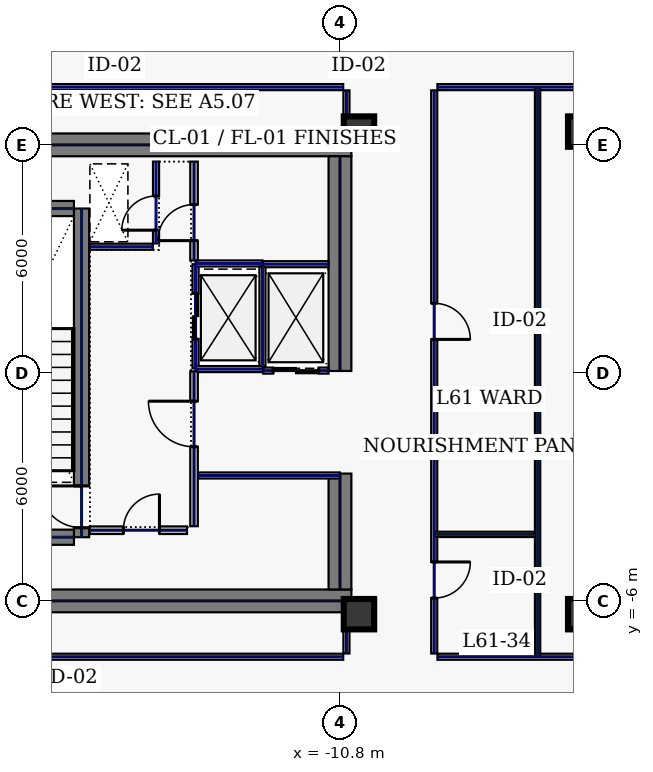
"""IFC4 building model, lengths in metres.
Left out: names, types, materials, properties, quantities, classifications, styles, units other than length and angle.
Written with IfcOpenShell. Run it as: python <this file> out.ifc"""

import sys

from ifc_helpers import new_model, si_unit, direction, frame, frame_2d, origin, origin_2d, place, context, subcontext, project, spatial, rectangle, hollow_rectangle, extrude, element, fill, save


model = new_model("IFC4")
c1 = context("Model", 3, precision=1e-05, world=origin(), true_north=direction((0.0, 1.0)))
c2 = subcontext(c1, "Body", "Model", "MODEL_VIEW")
j1 = project(units=[si_unit("LENGTHUNIT", "METRE"), si_unit("PLANEANGLEUNIT", "RADIAN")], contexts=[c1])
p1 = place(None, origin())
s1 = spatial("IfcSite", under=j1, at=p1, CompositionType="ELEMENT")
p2 = place(p1, origin())
s2 = spatial("IfcBuilding", under=s1, at=p2, CompositionType="ELEMENT")
p3 = place(p2, frame((0.0, 0.0, 263.0)))
s3 = spatial("IfcBuildingStorey", under=s2, at=p3, CompositionType="ELEMENT", Elevation=263.0)
for number, where, z_axis, x_axis in (
    (1, (-22.0, 6.0, 0.0), (0.0, 0.0, 1.0), (1.0, 0.0, 0.0)),
    (2, (-22.0, -6.0, 0.0), (0.0, 0.0, 1.0), (1.0, 0.0, 0.0)),
):
    element("IfcWall", number, at=place(p3, frame(where, z_axis=z_axis, x_axis=x_axis)), inside=s3, PredefinedType="SHEAR", context=c2, shape_type="SweptSolid", body=[
        extrude(rectangle(XDim=11.5, YDim=0.6, at=frame_2d((5.75, 0.0))), origin(), (0.0, 0.0, 1.0), 3.74),
    ])
p4 = place(p3, frame((-10.8, -5.7, 0.0), z_axis=(0.0, 0.0, 1.0), x_axis=(0.0, 1.0, 0.0)))
e3 = element("IfcWall", 3, at=p4, inside=s3, PredefinedType="SHEAR", context=c2, shape_type="SweptSolid", body=[
    extrude(rectangle(XDim=3.05, YDim=0.6, at=frame_2d((1.525, 0.0))), origin(), (0.0, 0.0, 1.0), 3.74),
])
p5 = place(p3, frame((-10.8, 0.05, 0.0), z_axis=(0.0, 0.0, 1.0), x_axis=(0.0, 1.0, 0.0)))
e4 = element("IfcWall", 4, at=p5, inside=s3, PredefinedType="SHEAR", context=c2, shape_type="SweptSolid", body=[
    extrude(rectangle(XDim=5.65, YDim=0.6, at=frame_2d((2.825, 0.0))), origin(), (0.0, 0.0, 1.0), 3.74),
])
p6 = place(p3, frame((-17.6, -4.325, 0.0), z_axis=(0.0, 0.0, 1.0), x_axis=(0.0, 1.0, 0.0)))
e5 = element("IfcWall", 5, at=p6, inside=s3, PredefinedType="SHEAR", context=c2, shape_type="SweptSolid", body=[
    extrude(rectangle(XDim=8.65, YDim=0.4, at=frame_2d((4.325, 0.0))), origin(), (0.0, 0.0, 1.0), 3.74),
])
p7 = place(p6, frame((0.25, 0.0, 0.0)))
e6 = element("IfcOpeningElement", 6, at=p7, cuts=e5, PredefinedType="OPENING", context=c2, shape_type="SweptSolid", body=[
    extrude(rectangle(XDim=1.1, YDim=2.2, at=frame_2d((0.55, 1.1))), frame((0.0, 0.21, 0.0), z_axis=(0.0, -1.0, 0.0), x_axis=(1.0, 0.0, 0.0)), (0.0, 0.0, 1.0), 0.42),
])
for number, where, z_axis, x_axis in (
    (7, (-21.2, -4.325, 0.0), (0.0, 0.0, 1.0), (1.0, 0.0, 0.0)),
    (8, (-21.2, 4.325, 0.0), (0.0, 0.0, 1.0), (1.0, 0.0, 0.0)),
):
    element("IfcWall", number, at=place(p3, frame(where, z_axis=z_axis, x_axis=x_axis)), inside=s3, PredefinedType="SHEAR", context=c2, shape_type="SweptSolid", body=[
        extrude(rectangle(XDim=3.4, YDim=0.4, at=frame_2d((1.7, 0.0))), origin(), (0.0, 0.0, 1.0), 3.74),
    ])
for number, where, z_axis, x_axis in (
    (9, (-10.3, -6.35, 0.0), (0.0, 0.0, 1.0), (1.0, 0.0, 0.0)),
    (10, (-10.3, 6.35, 0.0), (0.0, 0.0, 1.0), (1.0, 0.0, 0.0)),
    (11, (-4.4, -6.35, 0.0), (0.0, 0.0, 1.0), (1.0, 0.0, 0.0)),
    (12, (-4.4, 6.35, 0.0), (0.0, 0.0, 1.0), (1.0, 0.0, 0.0)),
):
    element("IfcColumn", number, at=place(p3, frame(where, z_axis=z_axis, x_axis=x_axis)), inside=s3, PredefinedType="COLUMN", context=c2, shape_type="SweptSolid", body=[
        extrude(hollow_rectangle(XDim=0.8, YDim=0.8, WallThickness=0.036, at=origin_2d()), origin(), (0.0, 0.0, 1.0), 3.74),
    ])
p8 = place(p3, frame((-14.6, 0.12, 0.0), z_axis=(0.0, 0.0, 1.0), x_axis=(0.0, 1.0, 0.0)))
e13 = element("IfcWall", 13, at=p8, inside=s3, PredefinedType="PARTITIONING", context=c2, shape_type="SweptSolid", body=[
    extrude(rectangle(XDim=2.74, YDim=0.16, at=frame_2d((1.37, 0.0))), origin(), (0.0, 0.0, 1.0), 3.74),
])
p9 = place(p8, frame((0.77, 0.0, 0.0)))
e14 = element("IfcOpeningElement", 14, at=p9, cuts=e13, PredefinedType="OPENING", context=c2, shape_type="SweptSolid", body=[
    extrude(rectangle(XDim=1.2, YDim=2.2, at=frame_2d((0.6, 1.1))), frame((0.0, 0.09, 0.0), z_axis=(0.0, -1.0, 0.0), x_axis=(1.0, 0.0, 0.0)), (0.0, 0.0, 1.0), 0.18),
])
for number, where, z_axis, x_axis in (
    (15, (-14.6, 0.1, 0.0), (0.0, 0.0, 1.0), (1.0, 0.0, 0.0)),
    (16, (-14.6, 2.88, 0.0), (0.0, 0.0, 1.0), (1.0, 0.0, 0.0)),
):
    element("IfcWall", number, at=place(p3, frame(where, z_axis=z_axis, x_axis=x_axis)), inside=s3, PredefinedType="PARTITIONING", context=c2, shape_type="SweptSolid", body=[
        extrude(rectangle(XDim=1.76, YDim=0.16, at=frame_2d((0.88, 0.0))), origin(), (0.0, 0.0, 1.0), 3.74),
    ])
p10 = place(p3, frame((-12.84, 0.18, 0.0), z_axis=(0.0, 0.0, 1.0), x_axis=(0.0, 1.0, 0.0)))
e17 = element("IfcWall", 17, at=p10, inside=s3, PredefinedType="PARTITIONING", context=c2, shape_type="SweptSolid", body=[
    extrude(rectangle(XDim=2.62, YDim=0.16, at=frame_2d((1.31, 0.0))), origin(), (0.0, 0.0, 1.0), 3.74),
])
p11 = place(p3, frame((-12.82, 0.06, 0.0), z_axis=(0.0, 0.0, 1.0), x_axis=(1.0, 0.0, 0.0)))
e18 = element("IfcWall", 18, at=p11, inside=s3, PredefinedType="PARTITIONING", context=c2, shape_type="SweptSolid", body=[
    extrude(rectangle(XDim=1.72, YDim=0.16, at=frame_2d((0.86, 0.0))), origin(), (0.0, 0.0, 1.0), 3.74),
])
p12 = place(p11, frame((0.26, 0.0, 0.0)))
e19 = element("IfcOpeningElement", 19, at=p12, cuts=e18, PredefinedType="OPENING", context=c2, shape_type="SweptSolid", body=[
    extrude(rectangle(XDim=1.2, YDim=2.2, at=frame_2d((0.6, 1.1))), frame((0.0, 0.09, 0.0), z_axis=(0.0, -1.0, 0.0), x_axis=(1.0, 0.0, 0.0)), (0.0, 0.0, 1.0), 0.18),
])
p13 = place(p3, frame((-12.82, 2.86, 0.0), z_axis=(0.0, 0.0, 1.0), x_axis=(1.0, 0.0, 0.0)))
e20 = element("IfcWall", 20, at=p13, inside=s3, PredefinedType="PARTITIONING", context=c2, shape_type="SweptSolid", body=[
    extrude(rectangle(XDim=1.72, YDim=0.16, at=frame_2d((0.86, 0.0))), origin(), (0.0, 0.0, 1.0), 3.74),
])
p14 = place(p3, frame((-15.64, 3.405, 0.0), z_axis=(0.0, 0.0, 1.0), x_axis=(0.0, 1.0, 0.0)))
e21 = element("IfcWall", 21, at=p14, inside=s3, PredefinedType="PARTITIONING", context=c2, shape_type="SweptSolid", body=[
    extrude(rectangle(XDim=2.155, YDim=0.16, at=frame_2d((1.078, 0.0))), origin(), (0.0, 0.0, 1.0), 3.74),
])
p15 = place(p14, frame((0.35, 0.0, 0.0)))
e22 = element("IfcOpeningElement", 22, at=p15, cuts=e21, PredefinedType="OPENING", context=c2, shape_type="SweptSolid", body=[
    extrude(rectangle(XDim=0.9, YDim=2.2, at=frame_2d((0.45, 1.1))), frame((0.0, 0.09, 0.0), z_axis=(0.0, -1.0, 0.0), x_axis=(1.0, 0.0, 0.0)), (0.0, 0.0, 1.0), 0.18),
])
p16 = place(p3, frame((-17.38, 3.32, 0.0), z_axis=(0.0, 0.0, 1.0), x_axis=(1.0, 0.0, 0.0)))
e23 = element("IfcWall", 23, at=p16, inside=s3, PredefinedType="PARTITIONING", context=c2, shape_type="SweptSolid", body=[
    extrude(rectangle(XDim=1.655, YDim=0.16, at=frame_2d((0.827, 0.0))), origin(), (0.0, 0.0, 1.0), 3.74),
])
p17 = place(p3, frame((-17.38, -4.14, 0.0), z_axis=(0.0, 0.0, 1.0), x_axis=(1.0, 0.0, 0.0)))
e24 = element("IfcWall", 24, at=p17, inside=s3, PredefinedType="SOLIDWALL", context=c2, shape_type="SweptSolid", body=[
    extrude(rectangle(XDim=2.555, YDim=0.2, at=frame_2d((1.277, 0.0))), origin(), (0.0, 0.0, 1.0), 3.74),
])
p18 = place(p17, frame((0.88, 0.0, 0.0)))
e25 = element("IfcOpeningElement", 25, at=p18, cuts=e24, PredefinedType="OPENING", context=c2, shape_type="SweptSolid", body=[
    extrude(rectangle(XDim=0.95, YDim=2.2, at=frame_2d((0.475, 1.1))), frame((0.0, 0.11, 0.0), z_axis=(0.0, -1.0, 0.0), x_axis=(1.0, 0.0, 0.0)), (0.0, 0.0, 1.0), 0.22),
])
p19 = place(p3, frame((-14.535, -2.7, 0.0), z_axis=(0.0, 0.0, 1.0), x_axis=(1.0, 0.0, 0.0)))
e26 = element("IfcWall", 26, at=p19, inside=s3, PredefinedType="PARTITIONING", context=c2, shape_type="SweptSolid", body=[
    extrude(rectangle(XDim=3.735, YDim=0.16, at=frame_2d((1.867, 0.0))), origin(), (0.0, 0.0, 1.0), 3.74),
])
p20 = place(p3, frame((-14.64, 2.96, 0.0), z_axis=(0.0, 0.0, 1.0), x_axis=(0.0, 1.0, 0.0)))
e27 = element("IfcWall", 27, at=p20, inside=s3, PredefinedType="SOLIDWALL", context=c2, shape_type="SweptSolid", body=[
    extrude(rectangle(XDim=2.6, YDim=0.2, at=frame_2d((1.3, 0.0))), origin(), (0.0, 0.0, 1.0), 3.74),
])
p21 = place(p20, frame((0.52, 0.0, 0.0)))
e28 = element("IfcOpeningElement", 28, at=p21, cuts=e27, PredefinedType="OPENING", context=c2, shape_type="SweptSolid", body=[
    extrude(rectangle(XDim=0.95, YDim=2.2, at=frame_2d((0.475, 1.1))), frame((0.0, 0.11, 0.0), z_axis=(0.0, -1.0, 0.0), x_axis=(1.0, 0.0, 0.0)), (0.0, 0.0, 1.0), 0.22),
])
p22 = place(p3, frame((-14.64, -4.035, 0.0), z_axis=(0.0, 0.0, 1.0), x_axis=(0.0, 1.0, 0.0)))
e29 = element("IfcWall", 29, at=p22, inside=s3, PredefinedType="SOLIDWALL", context=c2, shape_type="SweptSolid", body=[
    extrude(rectangle(XDim=4.075, YDim=0.2, at=frame_2d((2.038, 0.0))), origin(), (0.0, 0.0, 1.0), 3.74),
])
p23 = place(p22, frame((2.09, 0.0, 0.0)))
e30 = element("IfcOpeningElement", 30, at=p23, cuts=e29, PredefinedType="OPENING", context=c2, shape_type="SweptSolid", body=[
    extrude(rectangle(XDim=1.2, YDim=2.2, at=frame_2d((0.6, 1.1))), frame((0.0, 0.11, 0.0), z_axis=(0.0, -1.0, 0.0), x_axis=(1.0, 0.0, 0.0)), (0.0, 0.0, 1.0), 0.22),
])
p24 = place(p3, frame((-3.965, 7.52, 0.0), z_axis=(0.0, 0.0, 1.0), x_axis=(-1.0, 0.0, 0.0)))
e31 = element("IfcWall", 31, at=p24, inside=s3, PredefinedType="PARTITIONING", context=c2, shape_type="SweptSolid", body=[
    extrude(rectangle(XDim=4.27, YDim=0.16, at=frame_2d((2.135, 0.0))), origin(), (0.0, 0.0, 1.0), 3.74),
])
p25 = place(p3, frame((-8.32, 7.435, 0.0), z_axis=(0.0, 0.0, 1.0), x_axis=(0.0, -1.0, 0.0)))
e32 = element("IfcWall", 32, at=p25, inside=s3, PredefinedType="PARTITIONING", context=c2, shape_type="SweptSolid", body=[
    extrude(rectangle(XDim=14.82, YDim=0.16, at=frame_2d((7.41, 0.0))), origin(), (0.0, 0.0, 1.0), 3.74),
])
p26 = place(p25, frame((12.411, 0.0, 0.0)))
e33 = element("IfcOpeningElement", 33, at=p26, cuts=e32, PredefinedType="OPENING", context=c2, shape_type="SweptSolid", body=[
    extrude(rectangle(XDim=0.95, YDim=2.2, at=frame_2d((0.475, 1.1))), frame((0.0, 0.09, 0.0), z_axis=(0.0, -1.0, 0.0), x_axis=(1.0, 0.0, 0.0)), (0.0, 0.0, 1.0), 0.18),
])
p27 = place(p25, frame((5.604, 0.0, 0.0)))
e34 = element("IfcOpeningElement", 34, at=p27, cuts=e32, PredefinedType="OPENING", context=c2, shape_type="SweptSolid", body=[
    extrude(rectangle(XDim=0.95, YDim=2.2, at=frame_2d((0.475, 1.1))), frame((0.0, 0.09, 0.0), z_axis=(0.0, -1.0, 0.0), x_axis=(1.0, 0.0, 0.0)), (0.0, 0.0, 1.0), 0.18),
])
p28 = place(p3, frame((-8.235, -7.47, 0.0), z_axis=(0.0, 0.0, 1.0), x_axis=(1.0, 0.0, 0.0)))
e35 = element("IfcWall", 35, at=p28, inside=s3, PredefinedType="PARTITIONING", context=c2, shape_type="SweptSolid", body=[
    extrude(rectangle(XDim=4.27, YDim=0.16, at=frame_2d((2.135, 0.0))), origin(), (0.0, 0.0, 1.0), 3.74),
])
p29 = place(p3, frame((-10.63, -7.385, 0.0), z_axis=(0.0, 0.0, 1.0), x_axis=(0.0, 1.0, 0.0)))
e36 = element("IfcWall", 36, at=p29, inside=s3, PredefinedType="PARTITIONING", context=c2, shape_type="SweptSolid", body=[
    extrude(rectangle(XDim=0.965, YDim=0.16, at=frame_2d((0.482, 0.0))), origin(), (0.0, 0.0, 1.0), 3.74),
])
p30 = place(p3, frame((-10.63, 6.42, 0.0), z_axis=(0.0, 0.0, 1.0), x_axis=(0.0, 1.0, 0.0)))
e37 = element("IfcWall", 37, at=p30, inside=s3, PredefinedType="PARTITIONING", context=c2, shape_type="SweptSolid", body=[
    extrude(rectangle(XDim=1.015, YDim=0.16, at=frame_2d((0.508, 0.0))), origin(), (0.0, 0.0, 1.0), 3.74),
])
for number, where, z_axis, x_axis in (
    (38, (-10.715, 7.52, 0.0), (0.0, 0.0, 1.0), (-1.0, 0.0, 0.0)),
    (39, (-22.585, -7.47, 0.0), (0.0, 0.0, 1.0), (1.0, 0.0, 0.0)),
):
    element("IfcWall", number, at=place(p3, frame(where, z_axis=z_axis, x_axis=x_axis)), inside=s3, PredefinedType="PARTITIONING", context=c2, shape_type="SweptSolid", body=[
        extrude(rectangle(XDim=11.87, YDim=0.16, at=frame_2d((5.935, 0.0))), origin(), (0.0, 0.0, 1.0), 3.74),
    ])
p31 = place(p3, frame((-5.6, -7.465, 0.0), z_axis=(0.0, 0.0, 1.0), x_axis=(0.0, 1.0, 0.0)))
e40 = element("IfcWall", 40, at=p31, inside=s3, PredefinedType="PARTITIONING", context=c2, shape_type="SweptSolid", body=[
    extrude(rectangle(XDim=14.98, YDim=0.14, at=frame_2d((7.49, 0.0))), origin(), (0.0, 0.0, 1.0), 3.74),
])
p32 = place(p3, frame((-8.315, -4.25, 0.0), z_axis=(0.0, 0.0, 1.0), x_axis=(1.0, 0.0, 0.0)))
e41 = element("IfcWall", 41, at=p32, inside=s3, PredefinedType="PARTITIONING", context=c2, shape_type="SweptSolid", body=[
    extrude(rectangle(XDim=2.64, YDim=0.14, at=frame_2d((1.32, 0.0))), origin(), (0.0, 0.0, 1.0), 3.74),
])
p33 = place(p7, origin())
e42 = element("IfcDoor", 42, at=p33, inside=s3, OperationType="SINGLE_SWING_RIGHT", PredefinedType="DOOR", context=c2, shape_type="SweptSolid", body=[
    extrude(rectangle(XDim=1.1, YDim=2.2, at=frame_2d((0.55, 1.1))), frame((0.0, 0.025, 0.0), z_axis=(0.0, -1.0, 0.0), x_axis=(1.0, 0.0, 0.0)), (0.0, 0.0, 1.0), 0.05),
])
fill(e6, e42)
p34 = place(p9, origin())
e43 = element("IfcDoor", 43, at=p34, inside=s3, OperationType="SLIDING_TO_LEFT", PredefinedType="DOOR", context=c2, shape_type="SweptSolid", body=[
    extrude(rectangle(XDim=1.2, YDim=2.2, at=frame_2d((0.6, 1.1))), frame((0.0, 0.025, 0.0), z_axis=(0.0, -1.0, 0.0), x_axis=(1.0, 0.0, 0.0)), (0.0, 0.0, 1.0), 0.05),
])
fill(e14, e43)
p35 = place(p12, origin())
e44 = element("IfcDoor", 44, at=p35, inside=s3, OperationType="SLIDING_TO_LEFT", PredefinedType="DOOR", context=c2, shape_type="SweptSolid", body=[
    extrude(rectangle(XDim=1.2, YDim=2.2, at=frame_2d((0.6, 1.1))), frame((0.0, 0.025, 0.0), z_axis=(0.0, -1.0, 0.0), x_axis=(1.0, 0.0, 0.0)), (0.0, 0.0, 1.0), 0.05),
])
fill(e19, e44)
p36 = place(p15, origin())
e45 = element("IfcDoor", 45, at=p36, inside=s3, OperationType="SINGLE_SWING_LEFT", PredefinedType="DOOR", context=c2, shape_type="SweptSolid", body=[
    extrude(rectangle(XDim=0.9, YDim=2.2, at=frame_2d((0.45, 1.1))), frame((0.0, 0.025, 0.0), z_axis=(0.0, -1.0, 0.0), x_axis=(1.0, 0.0, 0.0)), (0.0, 0.0, 1.0), 0.05),
])
fill(e22, e45)
p37 = place(p18, origin())
e46 = element("IfcDoor", 46, at=p37, inside=s3, OperationType="SINGLE_SWING_RIGHT", PredefinedType="DOOR", context=c2, shape_type="SweptSolid", body=[
    extrude(rectangle(XDim=0.95, YDim=2.2, at=frame_2d((0.475, 1.1))), frame((0.0, 0.025, 0.0), z_axis=(0.0, -1.0, 0.0), x_axis=(1.0, 0.0, 0.0)), (0.0, 0.0, 1.0), 0.05),
])
fill(e25, e46)
p38 = place(p21, origin())
e47 = element("IfcDoor", 47, at=p38, inside=s3, OperationType="SINGLE_SWING_LEFT", PredefinedType="DOOR", context=c2, shape_type="SweptSolid", body=[
    extrude(rectangle(XDim=0.95, YDim=2.2, at=frame_2d((0.475, 1.1))), frame((0.0, 0.025, 0.0), z_axis=(0.0, -1.0, 0.0), x_axis=(1.0, 0.0, 0.0)), (0.0, 0.0, 1.0), 0.05),
])
fill(e28, e47)
p39 = place(p23, origin())
e48 = element("IfcDoor", 48, at=p39, inside=s3, OperationType="SINGLE_SWING_RIGHT", PredefinedType="DOOR", context=c2, shape_type="SweptSolid", body=[
    extrude(rectangle(XDim=1.2, YDim=2.2, at=frame_2d((0.6, 1.1))), frame((0.0, 0.025, 0.0), z_axis=(0.0, -1.0, 0.0), x_axis=(1.0, 0.0, 0.0)), (0.0, 0.0, 1.0), 0.05),
])
fill(e30, e48)
p40 = place(p26, origin())
e49 = element("IfcDoor", 49, at=p40, inside=s3, OperationType="SINGLE_SWING_LEFT", PredefinedType="DOOR", context=c2, shape_type="SweptSolid", body=[
    extrude(rectangle(XDim=0.95, YDim=2.2, at=frame_2d((0.475, 1.1))), frame((0.0, 0.025, 0.0), z_axis=(0.0, -1.0, 0.0), x_axis=(1.0, 0.0, 0.0)), (0.0, 0.0, 1.0), 0.05),
])
fill(e33, e49)
p41 = place(p27, origin())
e50 = element("IfcDoor", 50, at=p41, inside=s3, OperationType="SINGLE_SWING_RIGHT", PredefinedType="DOOR", context=c2, shape_type="SweptSolid", body=[
    extrude(rectangle(XDim=0.95, YDim=2.2, at=frame_2d((0.475, 1.1))), frame((0.0, 0.025, 0.0), z_axis=(0.0, -1.0, 0.0), x_axis=(1.0, 0.0, 0.0)), (0.0, 0.0, 1.0), 0.05),
])
fill(e34, e50)
save(model, sys.argv[1])
